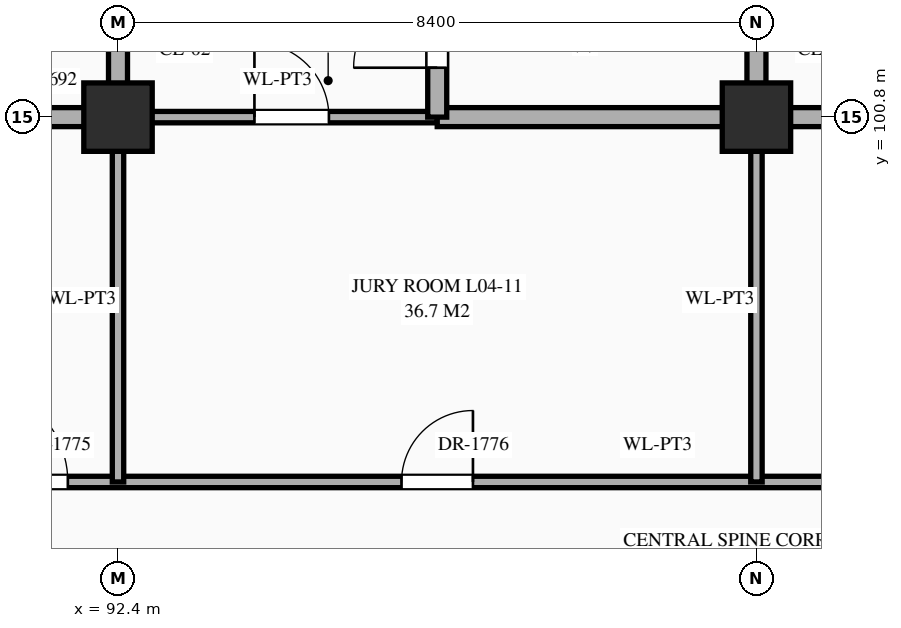
"""IFC4 building model, lengths in metres.
Left out: names, types, materials, properties, quantities, classifications, styles, units other than length and angle.
Written with IfcOpenShell. Run it as: python <this file> out.ifc"""

import sys

from ifc_helpers import new_model, si_unit, direction, frame, frame_2d, origin, origin_2d, place, context, subcontext, project, spatial, rectangle, extrude, element, fill, save


model = new_model("IFC4")
c1 = context("Model", 3, precision=1e-05, world=origin(), true_north=direction((0.0, 1.0)))
c2 = subcontext(c1, "Body", "Model", "MODEL_VIEW")
j1 = project(units=[si_unit("LENGTHUNIT", "METRE"), si_unit("PLANEANGLEUNIT", "RADIAN")], contexts=[c1])
p1 = place(None, origin())
s1 = spatial("IfcSite", under=j1, at=p1, CompositionType="ELEMENT")
p2 = place(p1, origin())
s2 = spatial("IfcBuilding", under=s1, at=p2, CompositionType="ELEMENT")
p3 = place(p2, frame((0.0, 0.0, 16.2)))
s3 = spatial("IfcBuildingStorey", under=s2, at=p3, CompositionType="ELEMENT", Elevation=16.2)
for number, where, z_axis, x_axis in (
    (1, (92.4, 100.8, 0.0), (0.0, 0.0, 1.0), (1.0, 0.0, 0.0)),
    (2, (100.8, 100.8, 0.0), (0.0, 0.0, 1.0), (1.0, 0.0, 0.0)),
):
    element("IfcColumn", number, at=place(p3, frame(where, z_axis=z_axis, x_axis=x_axis)), inside=s3, PredefinedType="COLUMN", context=c2, shape_type="SweptSolid", body=[
        extrude(rectangle(XDim=0.9, YDim=0.9, at=origin_2d()), origin(), (0.0, 0.0, 1.0), 5.4),
    ])
p4 = place(p3, frame((89.8, 96.0, 0.0), z_axis=(0.0, 0.0, 1.0), x_axis=(1.0, 0.0, 0.0)))
e3 = element("IfcWall", 3, at=p4, inside=s3, PredefinedType="STANDARD", context=c2, shape_type="SweptSolid", body=[
    extrude(rectangle(XDim=19.4, YDim=0.15, at=frame_2d((9.7, 0.0))), origin(), (0.0, 0.0, 1.0), 5.12),
])
p5 = place(p4, frame((0.66, 0.0, 0.0)))
e4 = element("IfcOpeningElement", 4, at=p5, cuts=e3, PredefinedType="OPENING", context=c2, shape_type="SweptSolid", body=[
    extrude(rectangle(XDim=1.28, YDim=2.35, at=frame_2d((0.64, 1.175))), frame((0.0, 0.087, 0.0), z_axis=(0.0, -1.0, 0.0), x_axis=(1.0, 0.0, 0.0)), (0.0, 0.0, 1.0), 0.174),
])
p6 = place(p4, frame((6.33, 0.0, 0.0)))
e5 = element("IfcOpeningElement", 5, at=p6, cuts=e3, PredefinedType="OPENING", context=c2, shape_type="SweptSolid", body=[
    extrude(rectangle(XDim=0.94, YDim=2.3, at=frame_2d((0.47, 1.15))), frame((0.0, 0.087, 0.0), z_axis=(0.0, -1.0, 0.0), x_axis=(1.0, 0.0, 0.0)), (0.0, 0.0, 1.0), 0.174),
])
p7 = place(p4, frame((14.71, 0.0, 0.0)))
e6 = element("IfcOpeningElement", 6, at=p7, cuts=e3, PredefinedType="OPENING", context=c2, shape_type="SweptSolid", body=[
    extrude(rectangle(XDim=0.98, YDim=2.35, at=frame_2d((0.49, 1.175))), frame((0.0, 0.087, 0.0), z_axis=(0.0, -1.0, 0.0), x_axis=(1.0, 0.0, 0.0)), (0.0, 0.0, 1.0), 0.174),
])
p8 = place(p3, frame((75.6, 100.8, 0.0), z_axis=(0.0, 0.0, 1.0), x_axis=(1.0, 0.0, 0.0)))
e7 = element("IfcWall", 7, at=p8, inside=s3, PredefinedType="STANDARD", context=c2, shape_type="SweptSolid", body=[
    extrude(rectangle(XDim=16.8, YDim=0.25, at=frame_2d((8.4, 0.0))), origin(), (0.0, 0.0, 1.0), 4.27),
])
p9 = place(p8, frame((3.65, 0.0, 0.0)))
e8 = element("IfcOpeningElement", 8, at=p9, cuts=e7, PredefinedType="OPENING", context=c2, shape_type="SweptSolid", body=[
    extrude(rectangle(XDim=1.1, YDim=2.2, at=frame_2d((0.55, 1.1))), frame((0.0, 0.137, 0.0), z_axis=(0.0, -1.0, 0.0), x_axis=(1.0, 0.0, 0.0)), (0.0, 0.0, 1.0), 0.274),
])
p10 = place(p8, frame((9.81, 0.0, 0.0)))
e9 = element("IfcOpeningElement", 9, at=p10, cuts=e7, PredefinedType="OPENING", context=c2, shape_type="SweptSolid", body=[
    extrude(rectangle(XDim=0.95, YDim=2.15, at=frame_2d((0.475, 1.075))), frame((0.0, 0.137, 0.0), z_axis=(0.0, -1.0, 0.0), x_axis=(1.0, 0.0, 0.0)), (0.0, 0.0, 1.0), 0.274),
])
p11 = place(p8, frame((12.45, 0.0, 0.0)))
e10 = element("IfcOpeningElement", 10, at=p11, cuts=e7, PredefinedType="OPENING", context=c2, shape_type="SweptSolid", body=[
    extrude(rectangle(XDim=1.1, YDim=2.2, at=frame_2d((0.55, 1.1))), frame((0.0, 0.137, 0.0), z_axis=(0.0, -1.0, 0.0), x_axis=(1.0, 0.0, 0.0)), (0.0, 0.0, 1.0), 0.274),
])
p12 = place(p8, frame((14.815, 0.0, 0.0)))
e11 = element("IfcOpeningElement", 11, at=p12, cuts=e7, PredefinedType="OPENING", context=c2, shape_type="SweptSolid", body=[
    extrude(rectangle(XDim=1.0, YDim=2.2, at=frame_2d((0.5, 1.1))), frame((0.0, 0.137, 0.0), z_axis=(0.0, -1.0, 0.0), x_axis=(1.0, 0.0, 0.0)), (0.0, 0.0, 1.0), 0.274),
])
p13 = place(p3, frame((92.4, 100.8, 0.0), z_axis=(0.0, 0.0, 1.0), x_axis=(1.0, 0.0, 0.0)))
e12 = element("IfcWall", 12, at=p13, inside=s3, PredefinedType="STANDARD", context=c2, shape_type="SweptSolid", body=[
    extrude(rectangle(XDim=4.2, YDim=0.15, at=frame_2d((2.1, 0.0))), origin(), (0.0, 0.0, 1.0), 4.27),
])
p14 = place(p13, frame((1.795, 0.0, 0.0)))
e13 = element("IfcOpeningElement", 13, at=p14, cuts=e12, PredefinedType="OPENING", context=c2, shape_type="SweptSolid", body=[
    extrude(rectangle(XDim=0.98, YDim=2.35, at=frame_2d((0.49, 1.175))), frame((0.0, 0.087, 0.0), z_axis=(0.0, -1.0, 0.0), x_axis=(1.0, 0.0, 0.0)), (0.0, 0.0, 1.0), 0.174),
])
p15 = place(p3, frame((96.6, 100.8, 0.0), z_axis=(0.0, 0.0, 1.0), x_axis=(1.0, 0.0, 0.0)))
e14 = element("IfcWall", 14, at=p15, inside=s3, PredefinedType="STANDARD", context=c2, shape_type="SweptSolid", body=[
    extrude(rectangle(XDim=12.6, YDim=0.25, at=frame_2d((6.3, 0.0))), origin(), (0.0, 0.0, 1.0), 4.27),
])
p16 = place(p15, frame((7.9, 0.0, 0.0)))
e15 = element("IfcOpeningElement", 15, at=p16, cuts=e14, PredefinedType="OPENING", context=c2, shape_type="SweptSolid", body=[
    extrude(rectangle(XDim=1.0, YDim=2.2, at=frame_2d((0.5, 1.1))), frame((0.0, 0.137, 0.0), z_axis=(0.0, -1.0, 0.0), x_axis=(1.0, 0.0, 0.0)), (0.0, 0.0, 1.0), 0.274),
])
p17 = place(p3, frame((92.4, 96.0, 0.0), z_axis=(0.0, 0.0, 1.0), x_axis=(0.0, 1.0, 0.0)))
e16 = element("IfcWall", 16, at=p17, inside=s3, PredefinedType="STANDARD", context=c2, shape_type="SweptSolid", body=[
    extrude(rectangle(XDim=4.8, YDim=0.15, at=frame_2d((2.4, 0.0))), origin(), (0.0, 0.0, 1.0), 4.37),
])
p18 = place(p3, frame((92.4, 100.8, 0.0), z_axis=(0.0, 0.0, 1.0), x_axis=(0.0, 1.0, 0.0)))
e17 = element("IfcWall", 17, at=p18, inside=s3, PredefinedType="STANDARD", context=c2, shape_type="SweptSolid", body=[
    extrude(rectangle(XDim=3.6, YDim=0.25, at=frame_2d((1.8, 0.0))), origin(), (0.0, 0.0, 1.0), 4.37),
])
p19 = place(p18, frame((0.885, 0.0, 0.0)))
e18 = element("IfcOpeningElement", 18, at=p19, cuts=e17, PredefinedType="OPENING", context=c2, shape_type="SweptSolid", body=[
    extrude(rectangle(XDim=1.0, YDim=2.2, at=frame_2d((0.5, 1.1))), frame((0.0, 0.137, 0.0), z_axis=(0.0, -1.0, 0.0), x_axis=(1.0, 0.0, 0.0)), (0.0, 0.0, 1.0), 0.274),
])
p20 = place(p3, frame((96.6, 100.8, 0.0), z_axis=(0.0, 0.0, 1.0), x_axis=(0.0, 1.0, 0.0)))
e19 = element("IfcWall", 19, at=p20, inside=s3, PredefinedType="STANDARD", context=c2, shape_type="SweptSolid", body=[
    extrude(rectangle(XDim=3.6, YDim=0.25, at=frame_2d((1.8, 0.0))), origin(), (0.0, 0.0, 1.0), 4.72),
])
p21 = place(p20, frame((0.65, 0.0, 0.0)))
e20 = element("IfcOpeningElement", 20, at=p21, cuts=e19, PredefinedType="OPENING", context=c2, shape_type="SweptSolid", body=[
    extrude(rectangle(XDim=1.1, YDim=2.2, at=frame_2d((0.55, 1.1))), frame((0.0, 0.137, 0.0), z_axis=(0.0, -1.0, 0.0), x_axis=(1.0, 0.0, 0.0)), (0.0, 0.0, 1.0), 0.274),
])
p22 = place(p3, frame((100.8, 96.0, 0.0), z_axis=(0.0, 0.0, 1.0), x_axis=(0.0, 1.0, 0.0)))
e21 = element("IfcWall", 21, at=p22, inside=s3, PredefinedType="STANDARD", context=c2, shape_type="SweptSolid", body=[
    extrude(rectangle(XDim=4.8, YDim=0.15, at=frame_2d((2.4, 0.0))), origin(), (0.0, 0.0, 1.0), 4.37),
])
p23 = place(p3, frame((100.8, 100.8, 0.0), z_axis=(0.0, 0.0, 1.0), x_axis=(0.0, 1.0, 0.0)))
e22 = element("IfcWall", 22, at=p23, inside=s3, PredefinedType="STANDARD", context=c2, shape_type="SweptSolid", body=[
    extrude(rectangle(XDim=2.4, YDim=0.25, at=frame_2d((1.2, 0.0))), origin(), (0.0, 0.0, 1.0), 4.37),
])
p24 = place(p23, frame((0.91, 0.0, 0.0)))
e23 = element("IfcOpeningElement", 23, at=p24, cuts=e22, PredefinedType="OPENING", context=c2, shape_type="SweptSolid", body=[
    extrude(rectangle(XDim=0.95, YDim=2.15, at=frame_2d((0.475, 1.075))), frame((0.0, 0.137, 0.0), z_axis=(0.0, -1.0, 0.0), x_axis=(1.0, 0.0, 0.0)), (0.0, 0.0, 1.0), 0.274),
])
p25 = place(p21, origin())
e24 = element("IfcDoor", 24, at=p25, inside=s3, OperationType="SINGLE_SWING_LEFT", PredefinedType="DOOR", context=c2, shape_type="SweptSolid", body=[
    extrude(rectangle(XDim=1.1, YDim=2.2, at=frame_2d((0.55, 1.1))), frame((0.0, 0.025, 0.0), z_axis=(0.0, -1.0, 0.0), x_axis=(1.0, 0.0, 0.0)), (0.0, 0.0, 1.0), 0.05),
])
fill(e20, e24)
p26 = place(p14, origin())
e25 = element("IfcDoor", 25, at=p26, inside=s3, OperationType="SINGLE_SWING_LEFT", PredefinedType="DOOR", context=c2, shape_type="SweptSolid", body=[
    extrude(rectangle(XDim=0.98, YDim=2.35, at=frame_2d((0.49, 1.175))), frame((0.0, 0.025, 0.0), z_axis=(0.0, -1.0, 0.0), x_axis=(1.0, 0.0, 0.0)), (0.0, 0.0, 1.0), 0.05),
])
fill(e13, e25)
p27 = place(p5, origin())
e26 = element("IfcDoor", 26, at=p27, inside=s3, OperationType="SINGLE_SWING_LEFT", PredefinedType="DOOR", context=c2, shape_type="SweptSolid", body=[
    extrude(rectangle(XDim=1.28, YDim=2.35, at=frame_2d((0.64, 1.175))), frame((0.0, 0.025, 0.0), z_axis=(0.0, -1.0, 0.0), x_axis=(1.0, 0.0, 0.0)), (0.0, 0.0, 1.0), 0.05),
])
fill(e4, e26)
p28 = place(p6, origin())
e27 = element("IfcDoor", 27, at=p28, inside=s3, OperationType="SINGLE_SWING_RIGHT", PredefinedType="DOOR", context=c2, shape_type="SweptSolid", body=[
    extrude(rectangle(XDim=0.94, YDim=2.3, at=frame_2d((0.47, 1.15))), frame((0.0, 0.025, 0.0), z_axis=(0.0, -1.0, 0.0), x_axis=(1.0, 0.0, 0.0)), (0.0, 0.0, 1.0), 0.05),
])
fill(e5, e27)
save(model, sys.argv[1])
